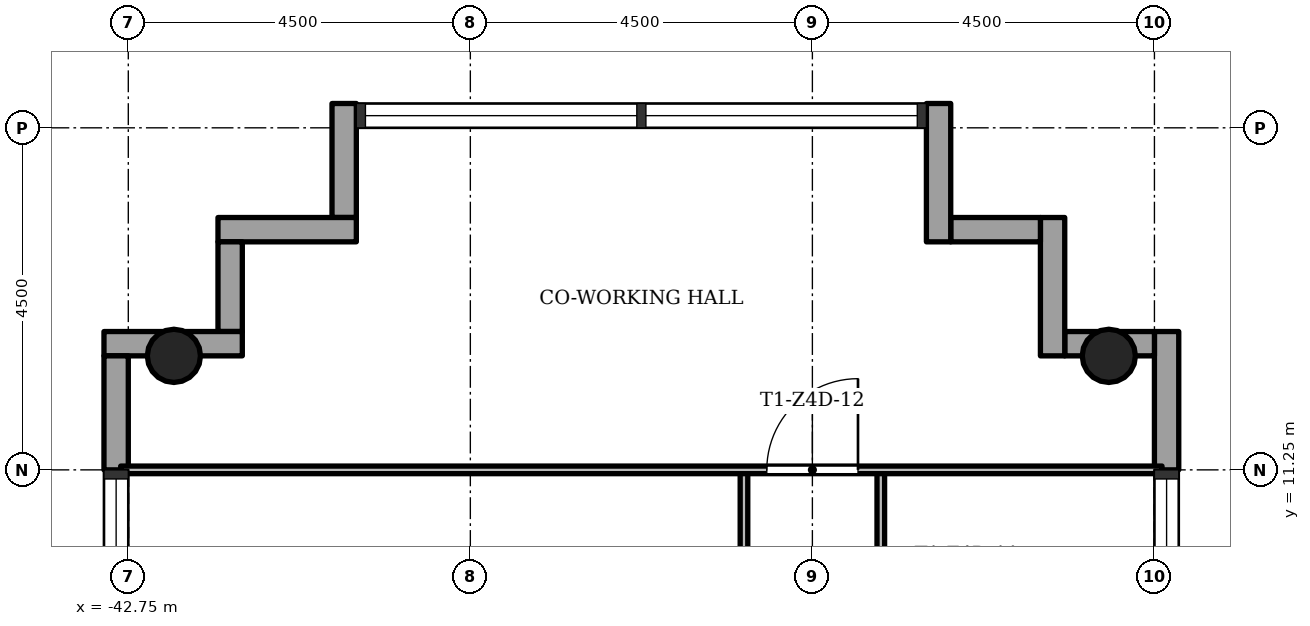
"""IFC4 building model, lengths in metres.
Left out: names, types, materials, properties, quantities, classifications, styles, units other than length and angle.
Written with IfcOpenShell. Run it as: python <this file> out.ifc"""

import sys

from ifc_helpers import new_model, si_unit, direction, frame, frame_2d, origin, origin_2d, place, context, subcontext, project, spatial, rectangle, hollow_circle, extrude, element, fill, save


model = new_model("IFC4")
c1 = context("Model", 3, precision=1e-05, world=origin(), true_north=direction((0.0, 1.0)))
c2 = subcontext(c1, "Body", "Model", "MODEL_VIEW")
j1 = project(units=[si_unit("LENGTHUNIT", "METRE"), si_unit("PLANEANGLEUNIT", "RADIAN")], contexts=[c1])
p1 = place(None, origin())
s1 = spatial("IfcSite", under=j1, at=p1, CompositionType="ELEMENT")
p2 = place(p1, origin())
s2 = spatial("IfcBuilding", under=s1, at=p2, CompositionType="ELEMENT")
p3 = place(p2, frame((0.0, 0.0, 199.4)))
s3 = spatial("IfcBuildingStorey", under=s2, at=p3, CompositionType="ELEMENT", Elevation=199.4)
for number, where, z_axis, x_axis in (
    (1, (-29.85, 12.75, 0.0), (0.0, 0.0, 1.0), (1.0, 0.0, 0.0)),
    (2, (-42.15, 12.75, 0.0), (0.0, 0.0, 1.0), (1.0, 0.0, 0.0)),
):
    element("IfcColumn", number, at=place(p3, frame(where, z_axis=z_axis, x_axis=x_axis)), inside=s3, PredefinedType="COLUMN", context=c2, shape_type="SweptSolid", body=[
        extrude(hollow_circle(Radius=0.35, WallThickness=0.025, at=origin_2d()), origin(), (0.0, 0.0, 1.0), 3.4),
    ])
p4 = place(p3, frame((-29.09, 11.25, -0.3), z_axis=(0.0, 0.0, 1.0), x_axis=(0.0, 1.0, 0.0)))
e3 = element("IfcWall", 3, at=p4, inside=s3, PredefinedType="STANDARD", context=c2, shape_type="SweptSolid", body=[
    extrude(rectangle(XDim=1.82, YDim=0.32, at=frame_2d((0.91, 0.0))), origin(), (0.0, 0.0, 1.0), 3.4),
])
p5 = place(p3, frame((-29.25, 12.91, -0.3), z_axis=(0.0, 0.0, 1.0), x_axis=(-1.0, 0.0, 0.0)))
e4 = element("IfcWall", 4, at=p5, inside=s3, PredefinedType="STANDARD", context=c2, shape_type="SweptSolid", body=[
    extrude(rectangle(XDim=1.18, YDim=0.32, at=frame_2d((0.59, 0.0))), origin(), (0.0, 0.0, 1.0), 3.4),
])
p6 = place(p3, frame((-30.59, 12.75, -0.3), z_axis=(0.0, 0.0, 1.0), x_axis=(0.0, 1.0, 0.0)))
e5 = element("IfcWall", 5, at=p6, inside=s3, PredefinedType="STANDARD", context=c2, shape_type="SweptSolid", body=[
    extrude(rectangle(XDim=1.82, YDim=0.32, at=frame_2d((0.91, 0.0))), origin(), (0.0, 0.0, 1.0), 3.4),
])
p7 = place(p3, frame((-30.75, 14.41, -0.3), z_axis=(0.0, 0.0, 1.0), x_axis=(-1.0, 0.0, 0.0)))
e6 = element("IfcWall", 6, at=p7, inside=s3, PredefinedType="STANDARD", context=c2, shape_type="SweptSolid", body=[
    extrude(rectangle(XDim=1.18, YDim=0.32, at=frame_2d((0.59, 0.0))), origin(), (0.0, 0.0, 1.0), 3.4),
])
p8 = place(p3, frame((-32.09, 14.25, -0.3), z_axis=(0.0, 0.0, 1.0), x_axis=(0.0, 1.0, 0.0)))
e7 = element("IfcWall", 7, at=p8, inside=s3, PredefinedType="STANDARD", context=c2, shape_type="SweptSolid", body=[
    extrude(rectangle(XDim=1.82, YDim=0.32, at=frame_2d((0.91, 0.0))), origin(), (0.0, 0.0, 1.0), 3.4),
])
p9 = place(p3, frame((-39.91, 16.07, -0.3), z_axis=(0.0, 0.0, 1.0), x_axis=(0.0, -1.0, 0.0)))
e8 = element("IfcWall", 8, at=p9, inside=s3, PredefinedType="STANDARD", context=c2, shape_type="SweptSolid", body=[
    extrude(rectangle(XDim=1.5, YDim=0.32, at=frame_2d((0.75, 0.0))), origin(), (0.0, 0.0, 1.0), 3.4),
])
p10 = place(p3, frame((-39.75, 14.41, -0.3), z_axis=(0.0, 0.0, 1.0), x_axis=(-1.0, 0.0, 0.0)))
e9 = element("IfcWall", 9, at=p10, inside=s3, PredefinedType="STANDARD", context=c2, shape_type="SweptSolid", body=[
    extrude(rectangle(XDim=1.82, YDim=0.32, at=frame_2d((0.91, 0.0))), origin(), (0.0, 0.0, 1.0), 3.4),
])
p11 = place(p3, frame((-41.41, 14.25, -0.3), z_axis=(0.0, 0.0, 1.0), x_axis=(0.0, -1.0, 0.0)))
e10 = element("IfcWall", 10, at=p11, inside=s3, PredefinedType="STANDARD", context=c2, shape_type="SweptSolid", body=[
    extrude(rectangle(XDim=1.18, YDim=0.32, at=frame_2d((0.59, 0.0))), origin(), (0.0, 0.0, 1.0), 3.4),
])
p12 = place(p3, frame((-41.25, 12.91, -0.3), z_axis=(0.0, 0.0, 1.0), x_axis=(-1.0, 0.0, 0.0)))
e11 = element("IfcWall", 11, at=p12, inside=s3, PredefinedType="STANDARD", context=c2, shape_type="SweptSolid", body=[
    extrude(rectangle(XDim=1.82, YDim=0.32, at=frame_2d((0.91, 0.0))), origin(), (0.0, 0.0, 1.0), 3.4),
])
p13 = place(p3, frame((-42.91, 12.75, -0.3), z_axis=(0.0, 0.0, 1.0), x_axis=(0.0, -1.0, 0.0)))
e12 = element("IfcWall", 12, at=p13, inside=s3, PredefinedType="STANDARD", context=c2, shape_type="SweptSolid", body=[
    extrude(rectangle(XDim=1.5, YDim=0.32, at=frame_2d((0.75, 0.0))), origin(), (0.0, 0.0, 1.0), 3.4),
])
p14 = place(p3, frame((-34.65, 8.55, 0.0), z_axis=(0.0, 0.0, 1.0), x_axis=(0.0, 1.0, 0.0)))
e13 = element("IfcWall", 13, at=p14, inside=s3, PredefinedType="PARTITIONING", context=c2, shape_type="SweptSolid", body=[
    extrude(rectangle(XDim=2.7, YDim=0.1, at=frame_2d((1.35, 0.0))), origin(), (0.0, 0.0, 1.0), 3.0),
])
p15 = place(p14, frame((0.07, 0.0, 0.0)))
e14 = element("IfcOpeningElement", 14, at=p15, cuts=e13, PredefinedType="OPENING", context=c2, shape_type="SweptSolid", body=[
    extrude(rectangle(XDim=0.9, YDim=2.1, at=frame_2d((0.45, 1.05))), frame((0.0, 0.06, 0.0), z_axis=(0.0, -1.0, 0.0), x_axis=(1.0, 0.0, 0.0)), (0.0, 0.0, 1.0), 0.12),
])
p16 = place(p3, frame((-32.85, 6.75, 0.0), z_axis=(0.0, 0.0, 1.0), x_axis=(0.0, 1.0, 0.0)))
e15 = element("IfcWall", 15, at=p16, inside=s3, PredefinedType="PARTITIONING", context=c2, shape_type="SweptSolid", body=[
    extrude(rectangle(XDim=4.5, YDim=0.1, at=frame_2d((2.25, 0.0))), origin(), (0.0, 0.0, 1.0), 3.0),
])
p17 = place(p16, frame((1.8, 0.0, 0.0)))
e16 = element("IfcOpeningElement", 16, at=p17, cuts=e15, PredefinedType="OPENING", context=c2, shape_type="SweptSolid", body=[
    extrude(rectangle(XDim=0.9, YDim=2.1, at=frame_2d((0.45, 1.05))), frame((0.0, 0.06, 0.0), z_axis=(0.0, -1.0, 0.0), x_axis=(1.0, 0.0, 0.0)), (0.0, 0.0, 1.0), 0.12),
])
p18 = place(p3, frame((-42.85, 11.25, 0.0), z_axis=(0.0, 0.0, 1.0), x_axis=(1.0, 0.0, 0.0)))
e17 = element("IfcWall", 17, at=p18, inside=s3, PredefinedType="PARTITIONING", context=c2, shape_type="SweptSolid", body=[
    extrude(rectangle(XDim=13.7, YDim=0.1, at=frame_2d((6.85, 0.0))), origin(), (0.0, 0.0, 1.0), 3.0),
])
p19 = place(p18, frame((8.5, 0.0, 0.0)))
e18 = element("IfcOpeningElement", 18, at=p19, cuts=e17, PredefinedType="OPENING", context=c2, shape_type="SweptSolid", body=[
    extrude(rectangle(XDim=1.2, YDim=2.1, at=frame_2d((0.6, 1.05))), frame((0.0, 0.06, 0.0), z_axis=(0.0, -1.0, 0.0), x_axis=(1.0, 0.0, 0.0)), (0.0, 0.0, 1.0), 0.12),
])
p20 = place(p19, origin())
e19 = element("IfcDoor", 19, at=p20, inside=s3, OperationType="SINGLE_SWING_LEFT", PredefinedType="DOOR", context=c2, shape_type="SweptSolid", body=[
    extrude(rectangle(XDim=1.2, YDim=2.1, at=frame_2d((0.6, 1.05))), frame((0.0, 0.025, 0.0), z_axis=(0.0, -1.0, 0.0), x_axis=(1.0, 0.0, 0.0)), (0.0, 0.0, 1.0), 0.05),
])
fill(e18, e19)
save(model, sys.argv[1])
